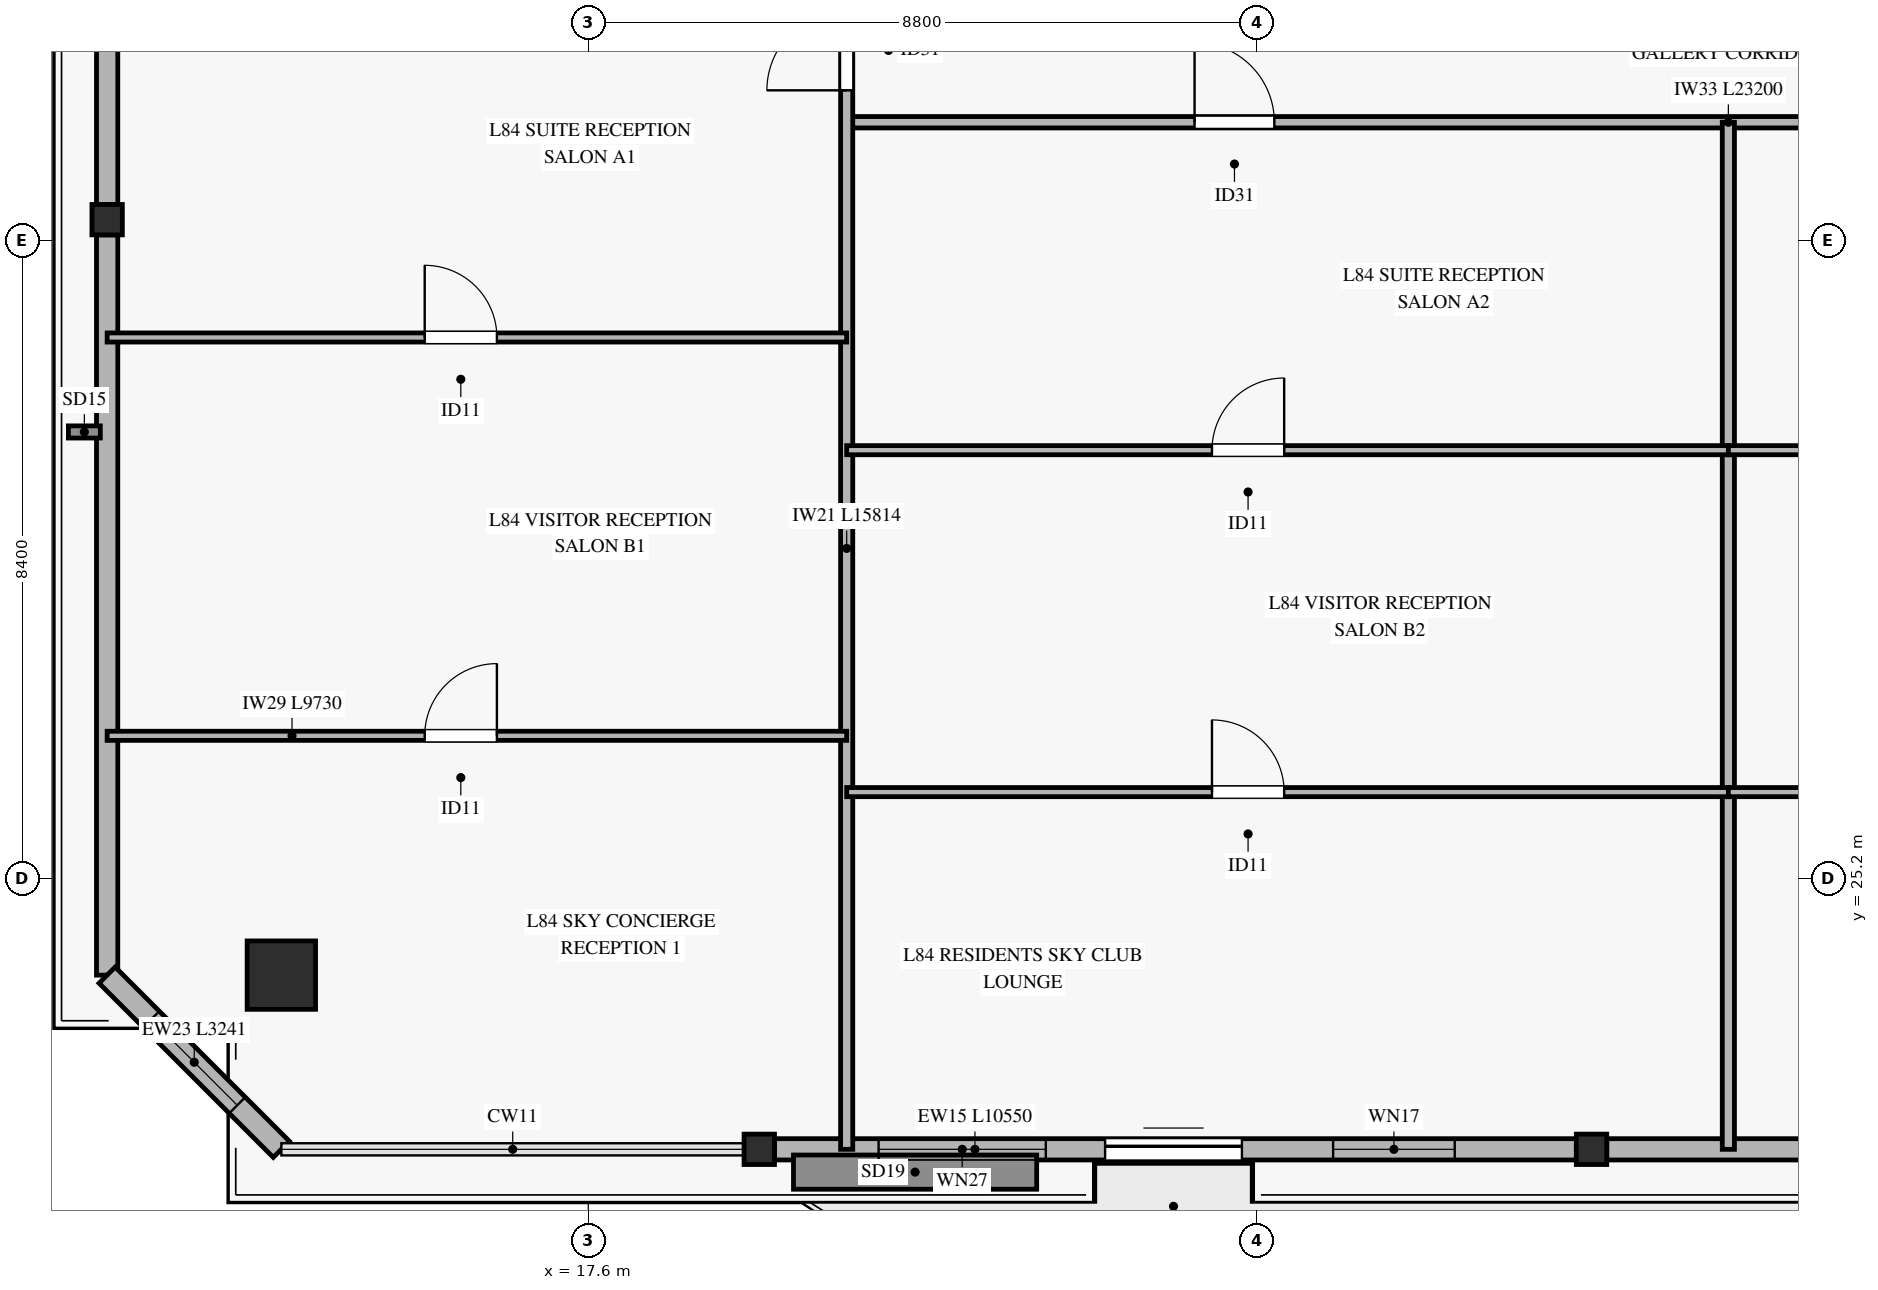
"""IFC4 building model, lengths in metres.
Left out: names, types, materials, properties, quantities, classifications, styles, units other than length and angle.
Written with IfcOpenShell. Run it as: python <this file> out.ifc"""

import sys

from ifc_helpers import new_model, si_unit, direction, frame, frame_2d, origin, origin_2d, place, context, subcontext, project, spatial, rectangle, hollow_rectangle, extrude, source, transform, mapped, element, fill, save


model = new_model("IFC4")
c1 = context("Model", 3, precision=1e-05, world=origin(), true_north=direction((0.0, 1.0)))
c2 = subcontext(c1, "Body", "Model", "MODEL_VIEW")
j1 = project(units=[si_unit("LENGTHUNIT", "METRE"), si_unit("PLANEANGLEUNIT", "RADIAN")], contexts=[c1])
p1 = place(None, origin())
s1 = spatial("IfcSite", under=j1, at=p1, CompositionType="ELEMENT")
p2 = place(p1, origin())
s2 = spatial("IfcBuilding", under=s1, at=p2, CompositionType="ELEMENT")
p3 = place(p2, frame((0.0, 0.0, 324.4)))
s3 = spatial("IfcBuildingStorey", under=s2, at=p3, CompositionType="ELEMENT", Elevation=324.4)
m1 = source(origin(), c2, "Body", "SweptSolid", [
    extrude(hollow_rectangle(XDim=0.9, YDim=0.9, WallThickness=0.04, at=origin_2d()), origin(), (0.0, 0.0, 1.0), 3.12),
])
p4 = place(p3, frame((13.562, 23.928, 0.0), z_axis=(0.0, 0.0, 1.0), x_axis=(1.0, 0.0, 0.0)))
e1 = element("IfcColumn", 1, at=p4, inside=s3, PredefinedType="COLUMN", context=c2, shape_type="MappedRepresentation", body=[
    mapped(m1, transform((0.0, 0.0, 0.0), x_axis=(1.0, 0.0, 0.0), y_axis=(0.0, 1.0, 0.0), z_axis=(0.0, 0.0, 1.0), scale=1.0)),
])
m2 = source(origin(), c2, "Body", "SweptSolid", [
    extrude(hollow_rectangle(XDim=0.4, YDim=0.4, WallThickness=0.02, at=origin_2d()), origin(), (0.0, 0.0, 1.0), 3.12),
])
for number, where, z_axis, x_axis in (
    (2, (19.85, 21.636, 0.0), (0.0, 0.0, 1.0), (1.0, 0.0, 0.0)),
    (3, (30.8, 21.636, 0.0), (0.0, 0.0, 1.0), (1.0, 0.0, 0.0)),
    (4, (11.27, 33.868, 0.0), (0.0, 0.0, 1.0), (1.0, 0.0, 0.0)),
):
    element("IfcColumn", number, at=place(p3, frame(where, z_axis=z_axis, x_axis=x_axis)), inside=s3, PredefinedType="COLUMN", context=c2, shape_type="MappedRepresentation", body=[
        mapped(m2, transform((0.0, 0.0, 0.0), x_axis=(1.0, 0.0, 0.0), y_axis=(0.0, 1.0, 0.0), z_axis=(0.0, 0.0, 1.0), scale=1.0)),
    ])
p5 = place(p3, frame((20.05, 21.636, 0.0), z_axis=(0.0, 0.0, 1.0), x_axis=(1.0, 0.0, 0.0)))
e5 = element("IfcWall", 5, at=p5, inside=s3, PredefinedType="SOLIDWALL", context=c2, shape_type="SweptSolid", body=[
    extrude(rectangle(XDim=10.55, YDim=0.28, at=frame_2d((5.275, 0.0))), origin(), (0.0, 0.0, 1.0), 2.75),
])
p6 = place(p5, frame((4.35, 0.0, 0.0)))
e6 = element("IfcOpeningElement", 6, at=p6, cuts=e5, PredefinedType="OPENING", context=c2, shape_type="SweptSolid", body=[
    extrude(rectangle(XDim=1.8, YDim=2.25, at=frame_2d((0.9, 1.125))), frame((0.0, 0.15, 0.0), z_axis=(0.0, -1.0, 0.0), x_axis=(1.0, 0.0, 0.0)), (0.0, 0.0, 1.0), 0.3),
])
p7 = place(p5, frame((1.37, 0.0, 0.45)))
e7 = element("IfcOpeningElement", 7, at=p7, cuts=e5, PredefinedType="OPENING", context=c2, shape_type="SweptSolid", body=[
    extrude(rectangle(XDim=2.2, YDim=2.1, at=frame_2d((1.1, 1.05))), frame((0.0, 0.15, 0.0), z_axis=(0.0, -1.0, 0.0), x_axis=(1.0, 0.0, 0.0)), (0.0, 0.0, 1.0), 0.3),
])
p8 = place(p5, frame((7.35, 0.0, 0.45)))
e8 = element("IfcOpeningElement", 8, at=p8, cuts=e5, PredefinedType="OPENING", context=c2, shape_type="SweptSolid", body=[
    extrude(rectangle(XDim=1.6, YDim=2.0, at=frame_2d((0.8, 1.0))), frame((0.0, 0.15, 0.0), z_axis=(0.0, -1.0, 0.0), x_axis=(1.0, 0.0, 0.0)), (0.0, 0.0, 1.0), 0.3),
])
p9 = place(p3, frame((31.0, 21.636, 0.0), z_axis=(0.0, 0.0, 1.0), x_axis=(1.0, 0.0, 0.0)))
e9 = element("IfcWall", 9, at=p9, inside=s3, PredefinedType="SOLIDWALL", context=c2, shape_type="SweptSolid", body=[
    extrude(rectangle(XDim=6.35, YDim=0.28, at=frame_2d((3.175, 0.0))), origin(), (0.0, 0.0, 1.0), 2.75),
])
p10 = place(p3, frame((11.27, 23.928, 0.0), z_axis=(0.0, 0.0, 1.0), x_axis=(0.0, 1.0, 0.0)))
e10 = element("IfcWall", 10, at=p10, inside=s3, PredefinedType="SOLIDWALL", context=c2, shape_type="SweptSolid", body=[
    extrude(rectangle(XDim=9.74, YDim=0.28, at=frame_2d((4.87, 0.0))), origin(), (0.0, 0.0, 1.0), 2.75),
])
p11 = place(p3, frame((11.27, 34.068, 0.0), z_axis=(0.0, 0.0, 1.0), x_axis=(0.0, 1.0, 0.0)))
e11 = element("IfcWall", 11, at=p11, inside=s3, PredefinedType="SOLIDWALL", context=c2, shape_type="SweptSolid", body=[
    extrude(rectangle(XDim=9.74, YDim=0.28, at=frame_2d((4.87, 0.0))), origin(), (0.0, 0.0, 1.0), 2.75),
])
p12 = place(p11, frame((3.787, 0.0, 0.45)))
e12 = element("IfcOpeningElement", 12, at=p12, cuts=e11, PredefinedType="OPENING", context=c2, shape_type="SweptSolid", body=[
    extrude(rectangle(XDim=2.2, YDim=2.1, at=frame_2d((1.1, 1.05))), frame((0.0, 0.15, 0.0), z_axis=(0.0, -1.0, 0.0), x_axis=(1.0, 0.0, 0.0)), (0.0, 0.0, 1.0), 0.3),
])
p13 = place(p3, frame((11.27, 23.928, 0.0), z_axis=(0.0, 0.0, 1.0), x_axis=(0.707106781187, -0.707106781187, 0.0)))
e13 = element("IfcWall", 13, at=p13, inside=s3, PredefinedType="SOLIDWALL", context=c2, shape_type="SweptSolid", body=[
    extrude(rectangle(XDim=3.241, YDim=0.3, at=frame_2d((1.621, 0.0))), origin(), (0.0, 0.0, 1.0), 2.75),
])
p14 = place(p13, frame((0.821, 0.0, 0.45)))
e14 = element("IfcOpeningElement", 14, at=p14, cuts=e13, PredefinedType="OPENING", context=c2, shape_type="SweptSolid", body=[
    extrude(rectangle(XDim=1.6, YDim=2.0, at=frame_2d((0.8, 1.0))), frame((0.0, 0.16, 0.0), z_axis=(0.0, -1.0, 0.0), x_axis=(1.0, 0.0, 0.0)), (0.0, 0.0, 1.0), 0.32),
])
p15 = place(p3, frame((21.0, 35.15, 0.0), z_axis=(0.0, 0.0, 1.0), x_axis=(1.0, 0.0, 0.0)))
e15 = element("IfcWall", 15, at=p15, inside=s3, PredefinedType="PARTITIONING", context=c2, shape_type="SweptSolid", body=[
    extrude(rectangle(XDim=23.2, YDim=0.15, at=frame_2d((11.6, 0.0))), origin(), (0.0, 0.0, 1.0), 2.405),
])
p16 = place(p15, frame((4.577, 0.0, 0.0)))
e16 = element("IfcOpeningElement", 16, at=p16, cuts=e15, PredefinedType="OPENING", context=c2, shape_type="SweptSolid", body=[
    extrude(rectangle(XDim=1.05, YDim=2.15, at=frame_2d((0.525, 1.075))), frame((0.0, 0.085, 0.0), z_axis=(0.0, -1.0, 0.0), x_axis=(1.0, 0.0, 0.0)), (0.0, 0.0, 1.0), 0.17),
])
p17 = place(p15, frame((16.177, 0.0, 0.0)))
e17 = element("IfcOpeningElement", 17, at=p17, cuts=e15, PredefinedType="OPENING", context=c2, shape_type="SweptSolid", body=[
    extrude(rectangle(XDim=1.05, YDim=2.15, at=frame_2d((0.525, 1.075))), frame((0.0, 0.085, 0.0), z_axis=(0.0, -1.0, 0.0), x_axis=(1.0, 0.0, 0.0)), (0.0, 0.0, 1.0), 0.17),
])
p18 = place(p3, frame((21.0, 21.636, 0.0), z_axis=(0.0, 0.0, 1.0), x_axis=(0.0, 1.0, 0.0)))
e18 = element("IfcWall", 18, at=p18, inside=s3, PredefinedType="PARTITIONING", context=c2, shape_type="SweptSolid", body=[
    extrude(rectangle(XDim=15.814, YDim=0.16, at=frame_2d((7.907, 0.0))), origin(), (0.0, 0.0, 1.0), 2.705),
])
p19 = place(p18, frame((13.934, 0.0, 0.0)))
e19 = element("IfcOpeningElement", 19, at=p19, cuts=e18, PredefinedType="OPENING", context=c2, shape_type="SweptSolid", body=[
    extrude(rectangle(XDim=1.05, YDim=2.15, at=frame_2d((0.525, 1.075))), frame((0.0, 0.09, 0.0), z_axis=(0.0, -1.0, 0.0), x_axis=(1.0, 0.0, 0.0)), (0.0, 0.0, 1.0), 0.18),
])
p20 = place(p3, frame((32.6, 21.636, 0.0), z_axis=(0.0, 0.0, 1.0), x_axis=(0.0, 1.0, 0.0)))
e20 = element("IfcWall", 20, at=p20, inside=s3, PredefinedType="PARTITIONING", context=c2, shape_type="SweptSolid", body=[
    extrude(rectangle(XDim=13.514, YDim=0.16, at=frame_2d((6.757, 0.0))), origin(), (0.0, 0.0, 1.0), 2.705),
])
p21 = place(p3, frame((11.27, 27.077, 0.0), z_axis=(0.0, 0.0, 1.0), x_axis=(1.0, 0.0, 0.0)))
e21 = element("IfcWall", 21, at=p21, inside=s3, PredefinedType="PARTITIONING", context=c2, shape_type="SweptSolid", body=[
    extrude(rectangle(XDim=9.73, YDim=0.12, at=frame_2d((4.865, 0.0))), origin(), (0.0, 0.0, 1.0), 2.405),
])
p22 = place(p21, frame((4.178, 0.0, 0.0)))
e22 = element("IfcOpeningElement", 22, at=p22, cuts=e21, PredefinedType="OPENING", context=c2, shape_type="SweptSolid", body=[
    extrude(rectangle(XDim=0.95, YDim=2.1, at=frame_2d((0.475, 1.05))), frame((0.0, 0.07, 0.0), z_axis=(0.0, -1.0, 0.0), x_axis=(1.0, 0.0, 0.0)), (0.0, 0.0, 1.0), 0.14),
])
p23 = place(p3, frame((11.27, 32.318, 0.0), z_axis=(0.0, 0.0, 1.0), x_axis=(1.0, 0.0, 0.0)))
e23 = element("IfcWall", 23, at=p23, inside=s3, PredefinedType="PARTITIONING", context=c2, shape_type="SweptSolid", body=[
    extrude(rectangle(XDim=9.73, YDim=0.12, at=frame_2d((4.865, 0.0))), origin(), (0.0, 0.0, 1.0), 2.405),
])
p24 = place(p23, frame((4.178, 0.0, 0.0)))
e24 = element("IfcOpeningElement", 24, at=p24, cuts=e23, PredefinedType="OPENING", context=c2, shape_type="SweptSolid", body=[
    extrude(rectangle(XDim=0.95, YDim=2.1, at=frame_2d((0.475, 1.05))), frame((0.0, 0.07, 0.0), z_axis=(0.0, -1.0, 0.0), x_axis=(1.0, 0.0, 0.0)), (0.0, 0.0, 1.0), 0.14),
])
p25 = place(p3, frame((21.0, 26.336, 0.0), z_axis=(0.0, 0.0, 1.0), x_axis=(1.0, 0.0, 0.0)))
e25 = element("IfcWall", 25, at=p25, inside=s3, PredefinedType="PARTITIONING", context=c2, shape_type="SweptSolid", body=[
    extrude(rectangle(XDim=11.6, YDim=0.12, at=frame_2d((5.8, 0.0))), origin(), (0.0, 0.0, 1.0), 2.405),
])
p26 = place(p25, frame((4.806, 0.0, 0.0)))
e26 = element("IfcOpeningElement", 26, at=p26, cuts=e25, PredefinedType="OPENING", context=c2, shape_type="SweptSolid", body=[
    extrude(rectangle(XDim=0.95, YDim=2.1, at=frame_2d((0.475, 1.05))), frame((0.0, 0.07, 0.0), z_axis=(0.0, -1.0, 0.0), x_axis=(1.0, 0.0, 0.0)), (0.0, 0.0, 1.0), 0.14),
])
p27 = place(p3, frame((21.0, 30.835, 0.0), z_axis=(0.0, 0.0, 1.0), x_axis=(1.0, 0.0, 0.0)))
e27 = element("IfcWall", 27, at=p27, inside=s3, PredefinedType="PARTITIONING", context=c2, shape_type="SweptSolid", body=[
    extrude(rectangle(XDim=11.6, YDim=0.12, at=frame_2d((5.8, 0.0))), origin(), (0.0, 0.0, 1.0), 2.405),
])
p28 = place(p27, frame((4.806, 0.0, 0.0)))
e28 = element("IfcOpeningElement", 28, at=p28, cuts=e27, PredefinedType="OPENING", context=c2, shape_type="SweptSolid", body=[
    extrude(rectangle(XDim=0.95, YDim=2.1, at=frame_2d((0.475, 1.05))), frame((0.0, 0.07, 0.0), z_axis=(0.0, -1.0, 0.0), x_axis=(1.0, 0.0, 0.0)), (0.0, 0.0, 1.0), 0.14),
])
p29 = place(p3, frame((32.6, 26.336, 0.0), z_axis=(0.0, 0.0, 1.0), x_axis=(1.0, 0.0, 0.0)))
e29 = element("IfcWall", 29, at=p29, inside=s3, PredefinedType="PARTITIONING", context=c2, shape_type="SweptSolid", body=[
    extrude(rectangle(XDim=11.6, YDim=0.12, at=frame_2d((5.8, 0.0))), origin(), (0.0, 0.0, 1.0), 2.405),
])
p30 = place(p29, frame((4.806, 0.0, 0.0)))
e30 = element("IfcOpeningElement", 30, at=p30, cuts=e29, PredefinedType="OPENING", context=c2, shape_type="SweptSolid", body=[
    extrude(rectangle(XDim=0.95, YDim=2.1, at=frame_2d((0.475, 1.05))), frame((0.0, 0.07, 0.0), z_axis=(0.0, -1.0, 0.0), x_axis=(1.0, 0.0, 0.0)), (0.0, 0.0, 1.0), 0.14),
])
p31 = place(p3, frame((32.6, 30.835, 0.0), z_axis=(0.0, 0.0, 1.0), x_axis=(1.0, 0.0, 0.0)))
e31 = element("IfcWall", 31, at=p31, inside=s3, PredefinedType="PARTITIONING", context=c2, shape_type="SweptSolid", body=[
    extrude(rectangle(XDim=11.6, YDim=0.12, at=frame_2d((5.8, 0.0))), origin(), (0.0, 0.0, 1.0), 2.405),
])
p32 = place(p31, frame((4.806, 0.0, 0.0)))
e32 = element("IfcOpeningElement", 32, at=p32, cuts=e31, PredefinedType="OPENING", context=c2, shape_type="SweptSolid", body=[
    extrude(rectangle(XDim=0.95, YDim=2.1, at=frame_2d((0.475, 1.05))), frame((0.0, 0.07, 0.0), z_axis=(0.0, -1.0, 0.0), x_axis=(1.0, 0.0, 0.0)), (0.0, 0.0, 1.0), 0.14),
])
m3 = source(origin(), c2, "Body", "SweptSolid", [
    extrude(rectangle(XDim=1.8, YDim=2.25, at=frame_2d((0.9, 1.125))), frame((0.0, 0.025, 0.0), z_axis=(0.0, -1.0, 0.0), x_axis=(1.0, 0.0, 0.0)), (0.0, 0.0, 1.0), 0.05),
])
p33 = place(p6, origin())
e33 = element("IfcDoor", 33, at=p33, inside=s3, OperationType="SLIDING_TO_LEFT", PredefinedType="DOOR", context=c2, shape_type="MappedRepresentation", body=[
    mapped(m3, transform((0.0, 0.0, 0.0), x_axis=(1.0, 0.0, 0.0), y_axis=(0.0, 1.0, 0.0), z_axis=(0.0, 0.0, 1.0), scale=1.0)),
])
fill(e6, e33)
m4 = source(origin(), c2, "Body", "SweptSolid", [
    extrude(rectangle(XDim=2.2, YDim=2.1, at=frame_2d((1.1, 1.05))), frame((0.0, 0.03, 0.0), z_axis=(0.0, -1.0, 0.0), x_axis=(1.0, 0.0, 0.0)), (0.0, 0.0, 1.0), 0.06),
])
p34 = place(p7, origin())
e34 = element("IfcWindow", 34, at=p34, inside=s3, PartitioningType="SINGLE_PANEL", PredefinedType="WINDOW", context=c2, shape_type="MappedRepresentation", body=[
    mapped(m4, transform((0.0, 0.0, 0.0), x_axis=(1.0, 0.0, 0.0), y_axis=(0.0, 1.0, 0.0), z_axis=(0.0, 0.0, 1.0), scale=1.0)),
])
fill(e7, e34)
m5 = source(origin(), c2, "Body", "SweptSolid", [
    extrude(rectangle(XDim=1.6, YDim=2.0, at=frame_2d((0.8, 1.0))), frame((0.0, 0.03, 0.0), z_axis=(0.0, -1.0, 0.0), x_axis=(1.0, 0.0, 0.0)), (0.0, 0.0, 1.0), 0.06),
])
p35 = place(p8, origin())
e35 = element("IfcWindow", 35, at=p35, inside=s3, PartitioningType="SINGLE_PANEL", PredefinedType="WINDOW", context=c2, shape_type="MappedRepresentation", body=[
    mapped(m5, transform((0.0, 0.0, 0.0), x_axis=(1.0, 0.0, 0.0), y_axis=(0.0, 1.0, 0.0), z_axis=(0.0, 0.0, 1.0), scale=1.0)),
])
fill(e8, e35)
p36 = place(p14, origin())
e36 = element("IfcWindow", 36, at=p36, inside=s3, PartitioningType="SINGLE_PANEL", PredefinedType="WINDOW", context=c2, shape_type="MappedRepresentation", body=[
    mapped(m5, transform((0.0, 0.0, 0.0), x_axis=(1.0, 0.0, 0.0), y_axis=(0.0, 1.0, 0.0), z_axis=(0.0, 0.0, 1.0), scale=1.0)),
])
fill(e14, e36)
m6 = source(origin(), c2, "Body", "SweptSolid", [
    extrude(rectangle(XDim=1.05, YDim=2.15, at=frame_2d((0.525, 1.075))), frame((0.0, 0.025, 0.0), z_axis=(0.0, -1.0, 0.0), x_axis=(1.0, 0.0, 0.0)), (0.0, 0.0, 1.0), 0.05),
])
p37 = place(p19, origin())
e37 = element("IfcDoor", 37, at=p37, inside=s3, OperationType="SINGLE_SWING_LEFT", PredefinedType="DOOR", context=c2, shape_type="MappedRepresentation", body=[
    mapped(m6, transform((0.0, 0.0, 0.0), x_axis=(1.0, 0.0, 0.0), y_axis=(0.0, 1.0, 0.0), z_axis=(0.0, 0.0, 1.0), scale=1.0)),
])
fill(e19, e37)
m7 = source(origin(), c2, "Body", "SweptSolid", [
    extrude(rectangle(XDim=0.95, YDim=2.1, at=frame_2d((0.475, 1.05))), frame((0.0, 0.025, 0.0), z_axis=(0.0, -1.0, 0.0), x_axis=(1.0, 0.0, 0.0)), (0.0, 0.0, 1.0), 0.05),
])
p38 = place(p24, origin())
e38 = element("IfcDoor", 38, at=p38, inside=s3, OperationType="SINGLE_SWING_LEFT", PredefinedType="DOOR", context=c2, shape_type="MappedRepresentation", body=[
    mapped(m7, transform((0.0, 0.0, 0.0), x_axis=(1.0, 0.0, 0.0), y_axis=(0.0, 1.0, 0.0), z_axis=(0.0, 0.0, 1.0), scale=1.0)),
])
fill(e24, e38)
p39 = place(p22, origin())
e39 = element("IfcDoor", 39, at=p39, inside=s3, OperationType="SINGLE_SWING_RIGHT", PredefinedType="DOOR", context=c2, shape_type="MappedRepresentation", body=[
    mapped(m7, transform((0.0, 0.0, 0.0), x_axis=(1.0, 0.0, 0.0), y_axis=(0.0, 1.0, 0.0), z_axis=(0.0, 0.0, 1.0), scale=1.0)),
])
fill(e22, e39)
p40 = place(p16, origin())
e40 = element("IfcDoor", 40, at=p40, inside=s3, OperationType="SINGLE_SWING_LEFT", PredefinedType="DOOR", context=c2, shape_type="MappedRepresentation", body=[
    mapped(m6, transform((0.0, 0.0, 0.0), x_axis=(1.0, 0.0, 0.0), y_axis=(0.0, 1.0, 0.0), z_axis=(0.0, 0.0, 1.0), scale=1.0)),
])
fill(e16, e40)
p41 = place(p28, origin())
e41 = element("IfcDoor", 41, at=p41, inside=s3, OperationType="SINGLE_SWING_RIGHT", PredefinedType="DOOR", context=c2, shape_type="MappedRepresentation", body=[
    mapped(m7, transform((0.0, 0.0, 0.0), x_axis=(1.0, 0.0, 0.0), y_axis=(0.0, 1.0, 0.0), z_axis=(0.0, 0.0, 1.0), scale=1.0)),
])
fill(e28, e41)
p42 = place(p26, origin())
e42 = element("IfcDoor", 42, at=p42, inside=s3, OperationType="SINGLE_SWING_LEFT", PredefinedType="DOOR", context=c2, shape_type="MappedRepresentation", body=[
    mapped(m7, transform((0.0, 0.0, 0.0), x_axis=(1.0, 0.0, 0.0), y_axis=(0.0, 1.0, 0.0), z_axis=(0.0, 0.0, 1.0), scale=1.0)),
])
fill(e26, e42)
save(model, sys.argv[1])
